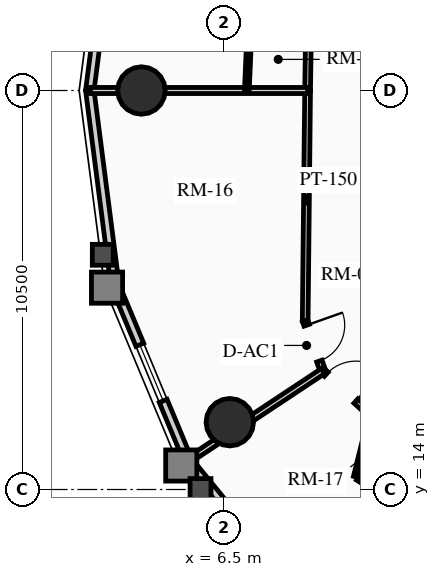
"""IFC4 building model, lengths in metres.
Left out: names, types, materials, properties, quantities, classifications, styles, units other than length and angle.
Written with IfcOpenShell. Run it as: python <this file> out.ifc"""

import sys

from ifc_helpers import new_model, si_unit, direction, frame, frame_2d, origin, origin_2d, place, context, subcontext, project, spatial, rectangle, circle, extrude, source, transform, mapped, element, fill, save


model = new_model("IFC4")
c1 = context("Model", 3, precision=1e-05, world=origin(), true_north=direction((0.0, 1.0)))
c2 = subcontext(c1, "Body", "Model", "MODEL_VIEW")
j1 = project(units=[si_unit("LENGTHUNIT", "METRE"), si_unit("PLANEANGLEUNIT", "RADIAN")], contexts=[c1])
p1 = place(None, origin())
s1 = spatial("IfcSite", under=j1, at=p1, CompositionType="ELEMENT")
p2 = place(p1, origin())
s2 = spatial("IfcBuilding", under=s1, at=p2, CompositionType="ELEMENT")
p3 = place(p2, frame((0.0, 0.0, 177.79)))
s3 = spatial("IfcBuildingStorey", under=s2, at=p3, CompositionType="ELEMENT", Elevation=177.79)
for number, where, z_axis, x_axis in (
    (1, (4.328, 24.5, 0.0), (0.0, 0.0, 1.0), (1.0, 0.0, 0.0)),
    (2, (6.653, 15.771, 0.0), (0.0, 0.0, 1.0), (1.0, 0.0, 0.0)),
):
    element("IfcColumn", number, at=place(p3, frame(where, z_axis=z_axis, x_axis=x_axis)), inside=s3, PredefinedType="USERDEFINED", context=c2, shape_type="SweptSolid", body=[
        extrude(circle(Radius=0.625, at=origin_2d()), origin(), (0.0, 0.0, 1.0), 2.91),
    ])
p4 = place(p3, frame((2.969, 24.5, 0.0), z_axis=(0.0, 0.0, 1.0), x_axis=(0.128287912609, 0.991736966881, 0.0)))
e3 = element("IfcWall", 3, at=p4, inside=s3, PredefinedType="SOLIDWALL", context=c2, shape_type="SweptSolid", body=[
    extrude(rectangle(XDim=5.163, YDim=0.22, at=frame_2d((2.582, 0.0))), origin(), (0.0, 0.0, 1.0), 2.245),
])
m1 = source(origin(), c2, "Body", "SweptSolid", [
    extrude(rectangle(XDim=1.6, YDim=1.3, at=frame_2d((0.8, 0.65))), frame((0.0, 0.12, 0.0), z_axis=(0.0, -1.0, 0.0), x_axis=(1.0, 0.0, 0.0)), (0.0, 0.0, 1.0), 0.24),
])
p5 = place(p4, frame((1.782, 0.0, 0.65)))
e4 = element("IfcOpeningElement", 4, at=p5, cuts=e3, PredefinedType="OPENING", context=c2, shape_type="MappedRepresentation", body=[
    mapped(m1, transform((0.0, 0.0, 0.0), x_axis=(1.0, 0.0, 0.0), y_axis=(0.0, 1.0, 0.0), z_axis=(0.0, 0.0, 1.0), scale=1.0)),
])
p6 = place(p3, frame((3.631, 19.38, 0.0), z_axis=(0.0, 0.0, 1.0), x_axis=(-0.128287912609, 0.991736966881, 0.0)))
e5 = element("IfcWall", 5, at=p6, inside=s3, PredefinedType="SOLIDWALL", context=c2, shape_type="SweptSolid", body=[
    extrude(rectangle(XDim=5.163, YDim=0.22, at=frame_2d((2.582, 0.0))), origin(), (0.0, 0.0, 1.0), 2.245),
])
p7 = place(p3, frame((5.553, 14.76, 0.0), z_axis=(0.0, 0.0, 1.0), x_axis=(-0.384144094086, 0.923273152961, 0.0)))
e6 = element("IfcWall", 6, at=p7, inside=s3, PredefinedType="SOLIDWALL", context=c2, shape_type="SweptSolid", body=[
    extrude(rectangle(XDim=5.003, YDim=0.22, at=frame_2d((2.501, 0.0))), origin(), (0.0, 0.0, 1.0), 2.245),
])
p8 = place(p7, frame((1.702, 0.0, 0.65)))
e7 = element("IfcOpeningElement", 7, at=p8, cuts=e6, PredefinedType="OPENING", context=c2, shape_type="MappedRepresentation", body=[
    mapped(m1, transform((0.0, 0.0, 0.0), x_axis=(1.0, 0.0, 0.0), y_axis=(0.0, 1.0, 0.0), z_axis=(0.0, 0.0, 1.0), scale=1.0)),
])
p9 = place(p3, frame((8.547, 11.094, 0.0), z_axis=(0.0, 0.0, 1.0), x_axis=(-0.632470615287, 0.774584353572, 0.0)))
e8 = element("IfcWall", 8, at=p9, inside=s3, PredefinedType="SOLIDWALL", context=c2, shape_type="SweptSolid", body=[
    extrude(rectangle(XDim=4.733, YDim=0.22, at=frame_2d((2.366, 0.0))), origin(), (0.0, 0.0, 1.0), 2.245),
])
p10 = place(p3, frame((8.791, 30.446, 0.0), z_axis=(0.0, 0.0, 1.0), x_axis=(-0.015230619426, -0.999884007389, 0.0)))
e9 = element("IfcWall", 9, at=p10, inside=s3, PredefinedType="PARTITIONING", context=c2, shape_type="SweptSolid", body=[
    extrude(rectangle(XDim=5.947, YDim=0.15, at=frame_2d((2.974, 0.0))), origin(), (0.0, 0.0, 1.0), 2.675),
])
p11 = place(p3, frame((8.7, 24.5, 0.0), z_axis=(0.0, 0.0, 1.0), x_axis=(-0.010507512335, -0.999944794568, 0.0)))
e10 = element("IfcWall", 10, at=p11, inside=s3, PredefinedType="PARTITIONING", context=c2, shape_type="SweptSolid", body=[
    extrude(rectangle(XDim=6.064, YDim=0.15, at=frame_2d((3.032, 0.0))), origin(), (0.0, 0.0, 1.0), 2.245),
])
p12 = place(p3, frame((8.636, 18.436, 0.0), z_axis=(0.0, 0.0, 1.0), x_axis=(0.333211866524, -0.942851977782, 0.0)))
e11 = element("IfcWall", 11, at=p12, inside=s3, PredefinedType="PARTITIONING", context=c2, shape_type="SweptSolid", body=[
    extrude(rectangle(XDim=1.402, YDim=0.15, at=frame_2d((0.701, 0.0))), origin(), (0.0, 0.0, 1.0), 2.245),
])
m2 = source(origin(), c2, "Body", "SweptSolid", [
    extrude(rectangle(XDim=1.0, YDim=2.015, at=frame_2d((0.5, 1.007))), frame((0.0, 0.085, 0.0), z_axis=(0.0, -1.0, 0.0), x_axis=(1.0, 0.0, 0.0)), (0.0, 0.0, 1.0), 0.17),
])
p13 = place(p12, frame((0.12, 0.0, 0.0)))
e12 = element("IfcOpeningElement", 12, at=p13, cuts=e11, PredefinedType="OPENING", context=c2, shape_type="MappedRepresentation", body=[
    mapped(m2, transform((0.0, 0.0, 0.0), x_axis=(1.0, 0.0, 0.0), y_axis=(0.0, 1.0, 0.0), z_axis=(0.0, 0.0, 1.0), scale=1.0)),
])
p14 = place(p3, frame((9.103, 17.115, 0.0), z_axis=(0.0, 0.0, 1.0), x_axis=(0.740186897911, -0.672401186912, 0.0)))
e13 = element("IfcWall", 13, at=p14, inside=s3, PredefinedType="PARTITIONING", context=c2, shape_type="SweptSolid", body=[
    extrude(rectangle(XDim=1.477, YDim=0.15, at=frame_2d((0.738, 0.0))), origin(), (0.0, 0.0, 1.0), 2.245),
])
m3 = source(origin(), c2, "Body", "SweptSolid", [
    extrude(rectangle(XDim=1.05, YDim=2.015, at=frame_2d((0.525, 1.007))), frame((0.0, 0.085, 0.0), z_axis=(0.0, -1.0, 0.0), x_axis=(1.0, 0.0, 0.0)), (0.0, 0.0, 1.0), 0.17),
])
p15 = place(p14, frame((0.12, 0.0, 0.0)))
e14 = element("IfcOpeningElement", 14, at=p15, cuts=e13, PredefinedType="OPENING", context=c2, shape_type="MappedRepresentation", body=[
    mapped(m3, transform((0.0, 0.0, 0.0), x_axis=(1.0, 0.0, 0.0), y_axis=(0.0, 1.0, 0.0), z_axis=(0.0, 0.0, 1.0), scale=1.0)),
])
p16 = place(p3, frame((8.7, 24.5, 0.0), z_axis=(0.0, 0.0, 1.0), x_axis=(-1.0, 0.0, 0.0)))
e15 = element("IfcWall", 15, at=p16, inside=s3, PredefinedType="PARTITIONING", context=c2, shape_type="SweptSolid", body=[
    extrude(rectangle(XDim=5.711, YDim=0.16, at=frame_2d((2.855, 0.0))), origin(), (0.0, 0.0, 1.0), 2.245),
])
p17 = place(p3, frame((9.103, 17.115, 0.0), z_axis=(0.0, 0.0, 1.0), x_axis=(-0.833535637115, -0.552465692745, 0.0)))
e16 = element("IfcWall", 16, at=p17, inside=s3, PredefinedType="PARTITIONING", context=c2, shape_type="SweptSolid", body=[
    extrude(rectangle(XDim=4.24, YDim=0.16, at=frame_2d((2.12, 0.0))), origin(), (0.0, 0.0, 1.0), 2.245),
])
p18 = place(p3, frame((7.351, 30.213, 0.0), z_axis=(0.0, 0.0, 1.0), x_axis=(-0.043800331293, -0.999040304982, 0.0)))
e17 = element("IfcWall", 17, at=p18, inside=s3, PredefinedType="PARTITIONING", context=c2, shape_type="SweptSolid", body=[
    extrude(rectangle(XDim=5.719, YDim=0.125, at=frame_2d((2.859, 0.0))), origin(), (0.0, 0.0, 1.0), 2.675),
])
p19 = place(p3, frame((10.343, 15.847, 0.0), z_axis=(0.0, 0.0, 1.0), x_axis=(-0.240988864291, -0.970527880737, 0.0)))
e18 = element("IfcWall", 18, at=p19, inside=s3, PredefinedType="PARTITIONING", context=c2, shape_type="SweptSolid", body=[
    extrude(rectangle(XDim=1.56, YDim=0.125, at=frame_2d((0.78, 0.0))), origin(), (0.0, 0.0, 1.0), 2.245),
])
p20 = place(p3, frame((10.02, 14.299, 0.0), z_axis=(0.0, 0.0, 1.0), x_axis=(0.846015763056, -0.533157883427, 0.0)))
e19 = element("IfcWall", 19, at=p20, inside=s3, PredefinedType="PARTITIONING", context=c2, shape_type="SweptSolid", body=[
    extrude(rectangle(XDim=1.991, YDim=0.125, at=frame_2d((0.996, 0.0))), origin(), (0.0, 0.0, 1.0), 2.675),
])
m4 = source(origin(), c2, "Body", "SweptSolid", [
    extrude(rectangle(XDim=0.9, YDim=2.005, at=frame_2d((0.45, 1.002))), frame((0.0, 0.073, 0.0), z_axis=(0.0, -1.0, 0.0), x_axis=(1.0, 0.0, 0.0)), (0.0, 0.0, 1.0), 0.145),
])
p21 = place(p20, frame((0.439, 0.0, 0.0)))
e20 = element("IfcOpeningElement", 20, at=p21, cuts=e19, PredefinedType="OPENING", context=c2, shape_type="MappedRepresentation", body=[
    mapped(m4, transform((0.0, 0.0, 0.0), x_axis=(1.0, 0.0, 0.0), y_axis=(0.0, 1.0, 0.0), z_axis=(0.0, 0.0, 1.0), scale=1.0)),
])
m5 = source(origin(), c2, "Body", "SweptSolid", [
    extrude(rectangle(XDim=1.6, YDim=1.3, at=frame_2d((0.8, 0.65))), frame((0.0, 0.03, 0.0), z_axis=(0.0, -1.0, 0.0), x_axis=(1.0, 0.0, 0.0)), (0.0, 0.0, 1.0), 0.06),
])
p22 = place(p8, origin())
e21 = element("IfcWindow", 21, at=p22, inside=s3, PartitioningType="SINGLE_PANEL", PredefinedType="WINDOW", context=c2, shape_type="MappedRepresentation", body=[
    mapped(m5, transform((0.0, 0.0, 0.0), x_axis=(1.0, 0.0, 0.0), y_axis=(0.0, 1.0, 0.0), z_axis=(0.0, 0.0, 1.0), scale=1.0)),
])
fill(e7, e21)
m6 = source(origin(), c2, "Body", "SweptSolid", [
    extrude(rectangle(XDim=1.0, YDim=2.015, at=frame_2d((0.5, 1.007))), frame((0.0, 0.025, 0.0), z_axis=(0.0, -1.0, 0.0), x_axis=(1.0, 0.0, 0.0)), (0.0, 0.0, 1.0), 0.05),
])
p23 = place(p13, origin())
e22 = element("IfcDoor", 22, at=p23, inside=s3, OperationType="SINGLE_SWING_LEFT", PredefinedType="DOOR", context=c2, shape_type="MappedRepresentation", body=[
    mapped(m6, transform((0.0, 0.0, 0.0), x_axis=(1.0, 0.0, 0.0), y_axis=(0.0, 1.0, 0.0), z_axis=(0.0, 0.0, 1.0), scale=1.0)),
])
fill(e12, e22)
m7 = source(origin(), c2, "Body", "SweptSolid", [
    extrude(rectangle(XDim=1.05, YDim=2.015, at=frame_2d((0.525, 1.007))), frame((0.0, 0.025, 0.0), z_axis=(0.0, -1.0, 0.0), x_axis=(1.0, 0.0, 0.0)), (0.0, 0.0, 1.0), 0.05),
])
p24 = place(p15, origin())
e23 = element("IfcDoor", 23, at=p24, inside=s3, OperationType="SINGLE_SWING_RIGHT", PredefinedType="DOOR", context=c2, shape_type="MappedRepresentation", body=[
    mapped(m7, transform((0.0, 0.0, 0.0), x_axis=(1.0, 0.0, 0.0), y_axis=(0.0, 1.0, 0.0), z_axis=(0.0, 0.0, 1.0), scale=1.0)),
])
fill(e14, e23)
save(model, sys.argv[1])
